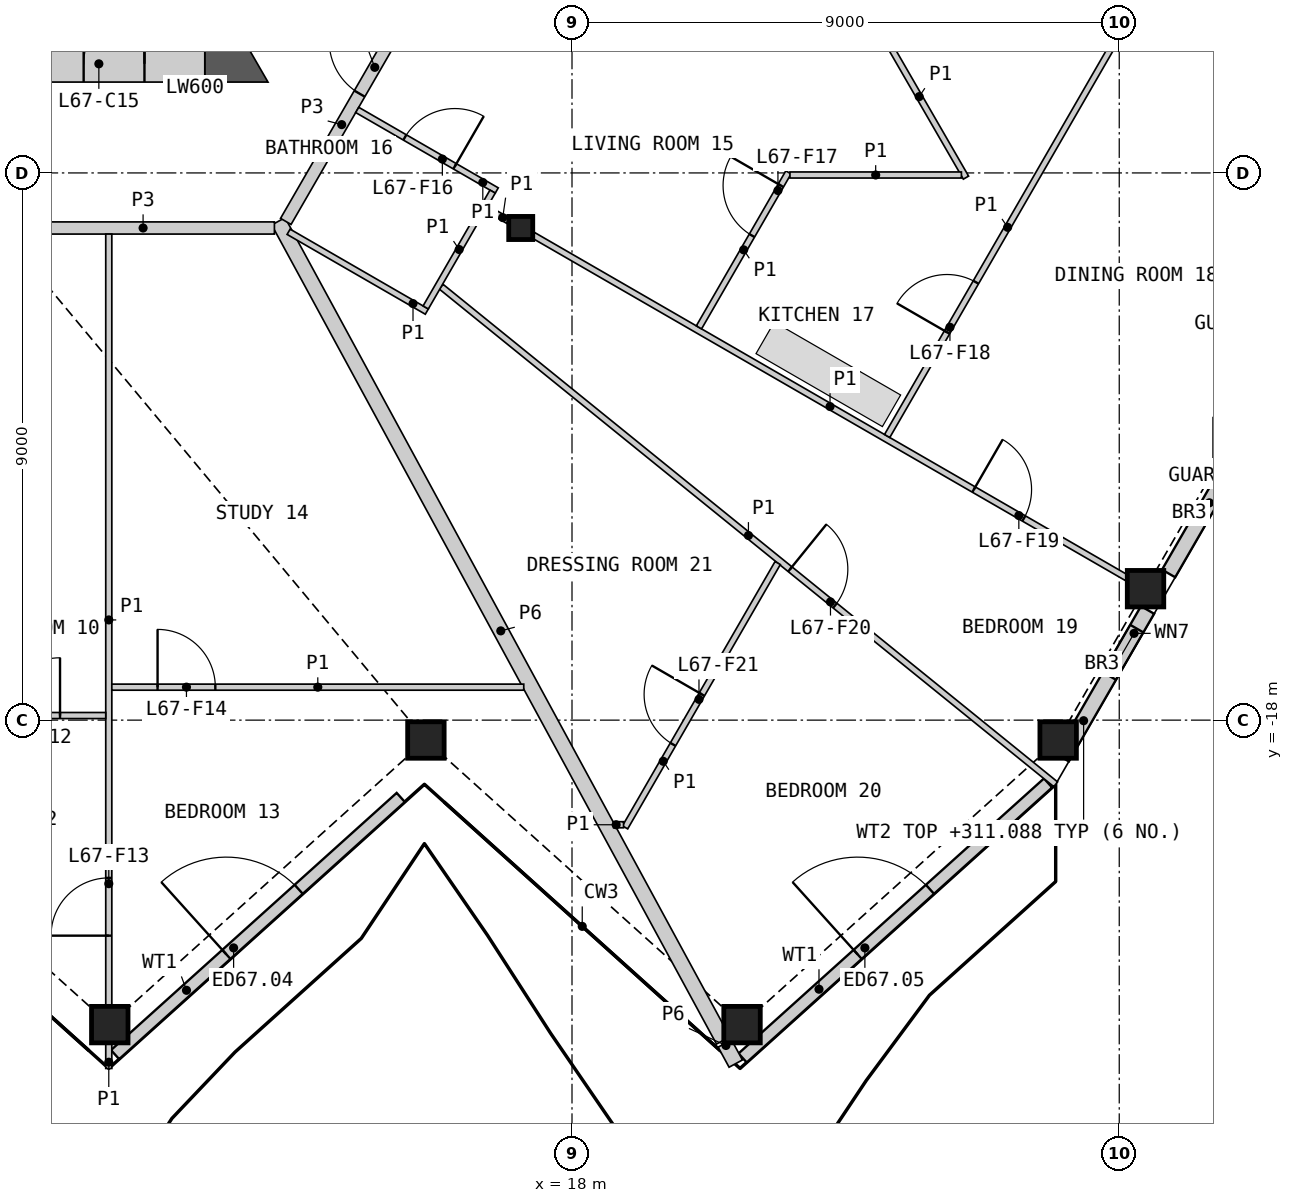
"""IFC4 building model, lengths in metres.
Left out: names, types, materials, properties, quantities, classifications, styles, units other than length and angle.
Written with IfcOpenShell. Run it as: python <this file> out.ifc"""

import sys

from ifc_helpers import new_model, si_unit, direction, frame, frame_2d, origin, origin_2d, place, context, subcontext, project, spatial, polyline, rectangle, hollow_rectangle, i_section, outline, extrude, element, fill, save


model = new_model("IFC4")
c1 = context("Model", 3, precision=1e-05, world=origin(), true_north=direction((0.0, 1.0)))
c2 = subcontext(c1, "Body", "Model", "MODEL_VIEW")
j1 = project(units=[si_unit("LENGTHUNIT", "METRE"), si_unit("PLANEANGLEUNIT", "RADIAN")], contexts=[c1])
p1 = place(None, origin())
s1 = spatial("IfcSite", under=j1, at=p1, CompositionType="ELEMENT")
p2 = place(p1, origin())
s2 = spatial("IfcBuilding", under=s1, at=p2, CompositionType="ELEMENT")
p3 = place(p2, frame((0.0, 0.0, 308.6)))
s3 = spatial("IfcBuildingStorey", under=s2, at=p3, CompositionType="ELEMENT", Elevation=308.6)
for number, where, z_axis, x_axis in (
    (1, (10.398, -23.008, 0.0), (0.0, 0.0, 1.0), (1.0, 0.0, 0.0)),
    (2, (15.597, -18.327, 0.0), (0.0, 0.0, 1.0), (1.0, 0.0, 0.0)),
    (3, (20.796, -23.008, 0.0), (0.0, 0.0, 1.0), (1.0, 0.0, 0.0)),
    (4, (25.995, -18.327, 0.0), (0.0, 0.0, 1.0), (1.0, 0.0, 0.0)),
    (5, (27.432, -15.838, 0.0), (0.0, 0.0, 1.0), (1.0, 0.0, 0.0)),
):
    element("IfcColumn", number, at=place(p3, frame(where, z_axis=z_axis, x_axis=x_axis)), inside=s3, PredefinedType="COLUMN", context=c2, shape_type="SweptSolid", body=[
        extrude(hollow_rectangle(XDim=0.6, YDim=0.6, WallThickness=0.04, at=origin_2d()), origin(), (0.0, 0.0, 1.0), 3.4),
    ])
p4 = place(p3, frame((17.157, -9.906, 0.0), z_axis=(0.0, 0.0, 1.0), x_axis=(1.0, 0.0, 0.0)))
e6 = element("IfcColumn", 6, at=p4, inside=s3, PredefinedType="COLUMN", context=c2, shape_type="SweptSolid", body=[
    extrude(i_section(OverallWidth=0.396, OverallDepth=0.381, WebThickness=0.019, FlangeThickness=0.03, at=origin_2d()), origin(), (0.0, 0.0, 1.0), 3.4),
])
p5 = place(p3, frame((10.485, -23.501, 0.0), z_axis=(0.0, 0.0, 1.0), x_axis=(0.743134744054, 0.669141802745, 0.0)))
e7 = element("IfcWall", 7, at=p5, inside=s3, PredefinedType="SOLIDWALL", context=c2, shape_type="SweptSolid", body=[
    extrude(rectangle(XDim=6.322, YDim=0.2, at=frame_2d((3.161, 0.0))), origin(), (0.0, 0.0, 1.0), 2.488),
])
p6 = place(p5, frame((2.463, 0.0, 0.0)))
e8 = element("IfcOpeningElement", 8, at=p6, cuts=e7, PredefinedType="OPENING", context=c2, shape_type="SweptSolid", body=[
    extrude(rectangle(XDim=1.6, YDim=2.25, at=frame_2d((0.8, 1.125))), frame((0.0, 0.11, 0.0), z_axis=(0.0, -1.0, 0.0), x_axis=(1.0, 0.0, 0.0)), (0.0, 0.0, 1.0), 0.22),
])
p7 = place(p3, frame((20.806, -23.556, 0.0), z_axis=(0.0, 0.0, 1.0), x_axis=(0.743145048269, 0.669130358924, 0.0)))
e9 = element("IfcWall", 9, at=p7, inside=s3, PredefinedType="SOLIDWALL", context=c2, shape_type="SweptSolid", body=[
    extrude(rectangle(XDim=6.759, YDim=0.2, at=frame_2d((3.379, 0.0))), origin(), (0.0, 0.0, 1.0), 2.488),
])
p8 = place(p7, frame((2.545, 0.0, 0.0)))
e10 = element("IfcOpeningElement", 10, at=p8, cuts=e9, PredefinedType="OPENING", context=c2, shape_type="SweptSolid", body=[
    extrude(rectangle(XDim=1.6, YDim=2.25, at=frame_2d((0.8, 1.125))), frame((0.0, 0.11, 0.0), z_axis=(0.0, -1.0, 0.0), x_axis=(1.0, 0.0, 0.0)), (0.0, 0.0, 1.0), 0.22),
])
p9 = place(p3, frame((26.063, -18.617, 0.0), z_axis=(0.0, 0.0, 1.0), x_axis=(0.499968627931, 0.866043515699, 0.0)))
e11 = element("IfcWall", 11, at=p9, inside=s3, PredefinedType="SOLIDWALL", context=c2, shape_type="SweptSolid", body=[
    extrude(rectangle(XDim=2.804, YDim=0.25, at=frame_2d((1.402, 0.0))), origin(), (0.0, 0.0, 1.0), 2.488),
])
p10 = place(p9, frame((1.55, 0.0, 1.6)))
e12 = element("IfcOpeningElement", 12, at=p10, cuts=e11, PredefinedType="OPENING", context=c2, shape_type="SweptSolid", body=[
    extrude(rectangle(XDim=0.9, YDim=0.6, at=frame_2d((0.45, 0.3))), frame((0.0, 0.135, 0.0), z_axis=(0.0, -1.0, 0.0), x_axis=(1.0, 0.0, 0.0)), (0.0, 0.0, 1.0), 0.27),
])
p11 = place(p3, frame((27.812, -15.588, 0.0), z_axis=(0.0, 0.0, 1.0), x_axis=(0.500032109083, 0.866006864803, 0.0)))
e13 = element("IfcWall", 13, at=p11, inside=s3, PredefinedType="SOLIDWALL", context=c2, shape_type="SweptSolid", body=[
    extrude(rectangle(XDim=2.684, YDim=0.25, at=frame_2d((1.342, 0.0))), origin(), (0.0, 0.0, 1.0), 2.488),
])
p12 = place(p3, origin())
e14 = element("IfcWall", 14, at=p12, inside=s3, PredefinedType="SHEAR", context=c2, shape_type="SweptSolid", body=[
    extrude(outline(polyline([(11.961, -7.506), (11.961, -6.906), (12.48, -6.606), (13.0, -7.506), (11.961, -7.506)])), origin(), (0.0, 0.0, 1.0), 3.1),
])
p13 = place(p3, frame((9.369, -7.206, 0.0), z_axis=(0.0, 0.0, 1.0), x_axis=(1.0, 0.0, 0.0)))
e15 = element("IfcWall", 15, at=p13, inside=s3, PredefinedType="SHEAR", context=c2, shape_type="SweptSolid", body=[
    extrude(rectangle(XDim=2.592, YDim=0.6, at=frame_2d((1.296, 0.0))), origin(), (0.0, 0.0, 1.0), 3.1),
])
p14 = place(p13, frame((0.6, 0.0, 0.0)))
e16 = element("IfcOpeningElement", 16, at=p14, cuts=e15, PredefinedType="OPENING", context=c2, shape_type="SweptSolid", body=[
    extrude(rectangle(XDim=1.0, YDim=2.1, at=frame_2d((0.5, 1.05))), frame((0.0, 0.31, 0.0), z_axis=(0.0, -1.0, 0.0), x_axis=(1.0, 0.0, 0.0)), (0.0, 0.0, 1.0), 0.62),
])
p15 = place(p3, frame((13.171, -9.796, 0.0), z_axis=(0.0, 0.0, 1.0), x_axis=(0.477178668135, -0.878806303275, 0.0)))
e17 = element("IfcWall", 17, at=p15, inside=s3, PredefinedType="PARTITIONING", context=c2, shape_type="SweptSolid", body=[
    extrude(rectangle(XDim=15.33, YDim=0.25, at=frame_2d((7.665, 0.0))), origin(), (0.0, 0.0, 1.0), 2.33),
])
p16 = place(p3, frame((8.786, -9.906, 0.0), z_axis=(0.0, 0.0, 1.0), x_axis=(1.0, 0.0, 0.0)))
e18 = element("IfcWall", 18, at=p16, inside=s3, PredefinedType="PARTITIONING", context=c2, shape_type="SweptSolid", body=[
    extrude(rectangle(XDim=4.32, YDim=0.2, at=frame_2d((2.16, 0.0))), origin(), (0.0, 0.0, 1.0), 3.1),
])
p17 = place(p3, frame((13.293, -9.797, 0.0), z_axis=(0.0, 0.0, 1.0), x_axis=(0.499967746641, 0.866044024469, 0.0)))
e19 = element("IfcWall", 19, at=p17, inside=s3, PredefinedType="PARTITIONING", context=c2, shape_type="SweptSolid", body=[
    extrude(rectangle(XDim=3.676, YDim=0.2, at=frame_2d((1.838, 0.0))), origin(), (0.0, 0.0, 1.0), 3.1),
])
p18 = place(p17, frame((2.426, 0.0, 0.0)))
e20 = element("IfcOpeningElement", 20, at=p18, cuts=e19, PredefinedType="OPENING", context=c2, shape_type="SweptSolid", body=[
    extrude(rectangle(XDim=1.0, YDim=2.1, at=frame_2d((0.5, 1.05))), frame((0.0, 0.11, 0.0), z_axis=(0.0, -1.0, 0.0), x_axis=(1.0, 0.0, 0.0)), (0.0, 0.0, 1.0), 0.22),
])
p19 = place(p3, frame((20.514, -23.318, 0.0), z_axis=(0.0, 0.0, 1.0), x_axis=(0.477077538769, -0.878861207474, 0.0)))
e21 = element("IfcWall", 21, at=p19, inside=s3, PredefinedType="PARTITIONING", context=c2, shape_type="SweptSolid", body=[
    extrude(rectangle(XDim=0.376, YDim=0.25, at=frame_2d((0.188, 0.0))), origin(), (0.0, 0.0, 1.0), 2.33),
])
p20 = place(p3, frame((15.848, -10.871, 0.0), z_axis=(0.0, 0.0, 1.0), x_axis=(0.77713687197, -0.629331615465, 0.0)))
e22 = element("IfcWall", 22, at=p20, inside=s3, PredefinedType="PARTITIONING", context=c2, shape_type="SweptSolid", body=[
    extrude(rectangle(XDim=13.004, YDim=0.1, at=frame_2d((6.502, 0.0))), origin(), (0.0, 0.0, 1.0), 2.33),
])
p21 = place(p20, frame((7.384, 0.0, 0.0)))
e23 = element("IfcOpeningElement", 23, at=p21, cuts=e22, PredefinedType="OPENING", context=c2, shape_type="SweptSolid", body=[
    extrude(rectangle(XDim=0.95, YDim=2.1, at=frame_2d((0.475, 1.05))), frame((0.0, 0.06, 0.0), z_axis=(0.0, -1.0, 0.0), x_axis=(1.0, 0.0, 0.0)), (0.0, 0.0, 1.0), 0.12),
])
p22 = place(p3, frame((10.382, -22.698, 0.0), z_axis=(0.0, 0.0, 1.0), x_axis=(0.0, 1.0, 0.0)))
e24 = element("IfcWall", 24, at=p22, inside=s3, PredefinedType="PARTITIONING", context=c2, shape_type="SweptSolid", body=[
    extrude(rectangle(XDim=12.692, YDim=0.1, at=frame_2d((6.346, 0.0))), origin(), (0.0, 0.0, 1.0), 2.33),
])
p23 = place(p22, frame((1.153, 0.0, 0.0)))
e25 = element("IfcOpeningElement", 25, at=p23, cuts=e24, PredefinedType="OPENING", context=c2, shape_type="SweptSolid", body=[
    extrude(rectangle(XDim=0.95, YDim=2.1, at=frame_2d((0.475, 1.05))), frame((0.0, 0.06, 0.0), z_axis=(0.0, -1.0, 0.0), x_axis=(1.0, 0.0, 0.0)), (0.0, 0.0, 1.0), 0.12),
])
p24 = place(p3, frame((17.365, -10.025, 0.0), z_axis=(0.0, 0.0, 1.0), x_axis=(0.866021046153, -0.500007547564, 0.0)))
e26 = element("IfcWall", 26, at=p24, inside=s3, PredefinedType="PARTITIONING", context=c2, shape_type="SweptSolid", body=[
    extrude(rectangle(XDim=11.267, YDim=0.1, at=frame_2d((5.634, 0.0))), origin(), (0.0, 0.0, 1.0), 2.33),
])
p25 = place(p24, frame((8.364, 0.0, 0.0)))
e27 = element("IfcOpeningElement", 27, at=p25, cuts=e26, PredefinedType="OPENING", context=c2, shape_type="SweptSolid", body=[
    extrude(rectangle(XDim=0.95, YDim=2.1, at=frame_2d((0.475, 1.05))), frame((0.0, 0.06, 0.0), z_axis=(0.0, -1.0, 0.0), x_axis=(1.0, 0.0, 0.0)), (0.0, 0.0, 1.0), 0.12),
])
p26 = place(p3, frame((0.05, -17.924, 0.0), z_axis=(0.0, 0.0, 1.0), x_axis=(1.0, 0.0, 0.0)))
e28 = element("IfcWall", 28, at=p26, inside=s3, PredefinedType="PARTITIONING", context=c2, shape_type="SweptSolid", body=[
    extrude(rectangle(XDim=10.282, YDim=0.1, at=frame_2d((5.141, 0.0))), origin(), (0.0, 0.0, 1.0), 2.33),
])
p27 = place(p26, frame((0.752, 0.0, 0.0)))
e29 = element("IfcOpeningElement", 29, at=p27, cuts=e28, PredefinedType="OPENING", context=c2, shape_type="SweptSolid", body=[
    extrude(rectangle(XDim=0.95, YDim=2.1, at=frame_2d((0.475, 1.05))), frame((0.0, 0.06, 0.0), z_axis=(0.0, -1.0, 0.0), x_axis=(1.0, 0.0, 0.0)), (0.0, 0.0, 1.0), 0.12),
])
p28 = place(p26, frame((8.58, 0.0, 0.0)))
e30 = element("IfcOpeningElement", 30, at=p28, cuts=e28, PredefinedType="OPENING", context=c2, shape_type="SweptSolid", body=[
    extrude(rectangle(XDim=0.95, YDim=2.1, at=frame_2d((0.475, 1.05))), frame((0.0, 0.06, 0.0), z_axis=(0.0, -1.0, 0.0), x_axis=(1.0, 0.0, 0.0)), (0.0, 0.0, 1.0), 0.12),
])
p29 = place(p3, frame((23.183, -13.327, 0.0), z_axis=(0.0, 0.0, 1.0), x_axis=(0.499991741039, 0.866030172045, 0.0)))
e31 = element("IfcWall", 31, at=p29, inside=s3, PredefinedType="PARTITIONING", context=c2, shape_type="SweptSolid", body=[
    extrude(rectangle(XDim=7.927, YDim=0.1, at=frame_2d((3.963, 0.0))), origin(), (0.0, 0.0, 1.0), 2.33),
])
p30 = place(p29, frame((1.97, 0.0, 0.0)))
e32 = element("IfcOpeningElement", 32, at=p30, cuts=e31, PredefinedType="OPENING", context=c2, shape_type="SweptSolid", body=[
    extrude(rectangle(XDim=0.95, YDim=2.1, at=frame_2d((0.475, 1.05))), frame((0.0, 0.06, 0.0), z_axis=(0.0, -1.0, 0.0), x_axis=(1.0, 0.0, 0.0)), (0.0, 0.0, 1.0), 0.12),
])
p31 = place(p3, frame((10.432, -17.458, 0.0), z_axis=(0.0, 0.0, 1.0), x_axis=(1.0, 0.0, 0.0)))
e33 = element("IfcWall", 33, at=p31, inside=s3, PredefinedType="PARTITIONING", context=c2, shape_type="SweptSolid", body=[
    extrude(rectangle(XDim=6.775, YDim=0.1, at=frame_2d((3.387, 0.0))), origin(), (0.0, 0.0, 1.0), 2.33),
])
p32 = place(p31, frame((0.752, 0.0, 0.0)))
e34 = element("IfcOpeningElement", 34, at=p32, cuts=e33, PredefinedType="OPENING", context=c2, shape_type="SweptSolid", body=[
    extrude(rectangle(XDim=0.95, YDim=2.1, at=frame_2d((0.475, 1.05))), frame((0.0, 0.06, 0.0), z_axis=(0.0, -1.0, 0.0), x_axis=(1.0, 0.0, 0.0)), (0.0, 0.0, 1.0), 0.12),
])
p33 = place(p3, frame((18.873, -19.764, 0.0), z_axis=(0.0, 0.0, 1.0), x_axis=(0.499983455602, 0.866034955486, 0.0)))
e35 = element("IfcWall", 35, at=p33, inside=s3, PredefinedType="PARTITIONING", context=c2, shape_type="SweptSolid", body=[
    extrude(rectangle(XDim=5.02, YDim=0.1, at=frame_2d((2.51, 0.0))), origin(), (0.0, 0.0, 1.0), 2.33),
])
p34 = place(p33, frame((1.576, 0.0, 0.0)))
e36 = element("IfcOpeningElement", 36, at=p34, cuts=e35, PredefinedType="OPENING", context=c2, shape_type="SweptSolid", body=[
    extrude(rectangle(XDim=0.95, YDim=2.1, at=frame_2d((0.475, 1.05))), frame((0.0, 0.06, 0.0), z_axis=(0.0, -1.0, 0.0), x_axis=(1.0, 0.0, 0.0)), (0.0, 0.0, 1.0), 0.12),
])
p35 = place(p3, frame((22.941, -6.413, 0.0), z_axis=(0.0, 0.0, 1.0), x_axis=(0.500013199183, -0.866017783098, 0.0)))
e37 = element("IfcWall", 37, at=p35, inside=s3, PredefinedType="PARTITIONING", context=c2, shape_type="SweptSolid", body=[
    extrude(rectangle(XDim=3.077, YDim=0.1, at=frame_2d((1.539, 0.0))), origin(), (0.0, 0.0, 1.0), 2.33),
])
p36 = place(p3, frame((20.088, -11.54, 0.0), z_axis=(0.0, 0.0, 1.0), x_axis=(0.500055103712, 0.865993587304, 0.0)))
e38 = element("IfcWall", 38, at=p36, inside=s3, PredefinedType="PARTITIONING", context=c2, shape_type="SweptSolid", body=[
    extrude(rectangle(XDim=2.944, YDim=0.1, at=frame_2d((1.472, 0.0))), origin(), (0.0, 0.0, 1.0), 2.33),
])
p37 = place(p36, frame((1.744, 0.0, 0.0)))
e39 = element("IfcOpeningElement", 39, at=p37, cuts=e38, PredefinedType="OPENING", context=c2, shape_type="SweptSolid", body=[
    extrude(rectangle(XDim=0.95, YDim=2.1, at=frame_2d((0.475, 1.05))), frame((0.0, 0.06, 0.0), z_axis=(0.0, -1.0, 0.0), x_axis=(1.0, 0.0, 0.0)), (0.0, 0.0, 1.0), 0.12),
])
p38 = place(p3, frame((21.584, -9.034, 0.0), z_axis=(0.0, 0.0, 1.0), x_axis=(1.0, 0.0, 0.0)))
e40 = element("IfcWall", 40, at=p38, inside=s3, PredefinedType="PARTITIONING", context=c2, shape_type="SweptSolid", body=[
    extrude(rectangle(XDim=2.82, YDim=0.1, at=frame_2d((1.41, 0.0))), origin(), (0.0, 0.0, 1.0), 2.33),
])
p39 = place(p3, frame((14.468, -7.964, 0.0), z_axis=(0.0, 0.0, 1.0), x_axis=(0.865989200783, -0.500062700197, 0.0)))
e41 = element("IfcWall", 41, at=p39, inside=s3, PredefinedType="PARTITIONING", context=c2, shape_type="SweptSolid", body=[
    extrude(rectangle(XDim=2.65, YDim=0.1, at=frame_2d((1.325, 0.0))), origin(), (0.0, 0.0, 1.0), 2.33),
])
p40 = place(p39, frame((0.905, 0.0, 0.0)))
e42 = element("IfcOpeningElement", 42, at=p40, cuts=e41, PredefinedType="OPENING", context=c2, shape_type="SweptSolid", body=[
    extrude(rectangle(XDim=0.95, YDim=2.1, at=frame_2d((0.475, 1.05))), frame((0.0, 0.06, 0.0), z_axis=(0.0, -1.0, 0.0), x_axis=(1.0, 0.0, 0.0)), (0.0, 0.0, 1.0), 0.12),
])
p41 = place(p3, frame((13.339, -9.968, 0.0), z_axis=(0.0, 0.0, 1.0), x_axis=(0.866036909293, -0.499980071345, 0.0)))
e43 = element("IfcWall", 43, at=p41, inside=s3, PredefinedType="PARTITIONING", context=c2, shape_type="SweptSolid", body=[
    extrude(rectangle(XDim=2.625, YDim=0.1, at=frame_2d((1.312, 0.0))), origin(), (0.0, 0.0, 1.0), 2.33),
])
p42 = place(p3, frame((15.594, -11.212, 0.0), z_axis=(0.0, 0.0, 1.0), x_axis=(0.499898558967, 0.866083962871, 0.0)))
e44 = element("IfcWall", 44, at=p42, inside=s3, PredefinedType="PARTITIONING", context=c2, shape_type="SweptSolid", body=[
    extrude(rectangle(XDim=2.2, YDim=0.1, at=frame_2d((1.1, 0.0))), origin(), (0.0, 0.0, 1.0), 2.33),
])
p43 = place(p3, frame((16.594, -9.581, 0.0), z_axis=(0.0, 0.0, 1.0), x_axis=(0.866036909293, -0.499980071345, 0.0)))
e45 = element("IfcWall", 45, at=p43, inside=s3, PredefinedType="PARTITIONING", context=c2, shape_type="SweptSolid", body=[
    extrude(rectangle(XDim=0.41, YDim=0.1, at=frame_2d((0.205, 0.0))), origin(), (0.0, 0.0, 1.0), 2.33),
])
p44 = place(p3, frame((10.382, -23.729, 0.0), z_axis=(0.0, 0.0, 1.0), x_axis=(0.0, 1.0, 0.0)))
e46 = element("IfcWall", 46, at=p44, inside=s3, PredefinedType="PARTITIONING", context=c2, shape_type="SweptSolid", body=[
    extrude(rectangle(XDim=0.411, YDim=0.1, at=frame_2d((0.206, 0.0))), origin(), (0.0, 0.0, 1.0), 2.33),
])
p45 = place(p3, frame((18.685, -19.721, 0.0), z_axis=(0.0, 0.0, 1.0), x_axis=(1.0, 0.0, 0.0)))
e47 = element("IfcWall", 47, at=p45, inside=s3, PredefinedType="PARTITIONING", context=c2, shape_type="SweptSolid", body=[
    extrude(rectangle(XDim=0.162, YDim=0.1, at=frame_2d((0.081, 0.0))), origin(), (0.0, 0.0, 1.0), 2.33),
])
p46 = place(p6, origin())
e48 = element("IfcDoor", 48, at=p46, inside=s3, OperationType="DOUBLE_DOOR_SINGLE_SWING", PredefinedType="DOOR", context=c2, shape_type="SweptSolid", body=[
    extrude(rectangle(XDim=1.6, YDim=2.25, at=frame_2d((0.8, 1.125))), frame((0.0, 0.025, 0.0), z_axis=(0.0, -1.0, 0.0), x_axis=(1.0, 0.0, 0.0)), (0.0, 0.0, 1.0), 0.05),
])
fill(e8, e48)
p47 = place(p8, origin())
e49 = element("IfcDoor", 49, at=p47, inside=s3, OperationType="DOUBLE_DOOR_SINGLE_SWING", PredefinedType="DOOR", context=c2, shape_type="SweptSolid", body=[
    extrude(rectangle(XDim=1.6, YDim=2.25, at=frame_2d((0.8, 1.125))), frame((0.0, 0.025, 0.0), z_axis=(0.0, -1.0, 0.0), x_axis=(1.0, 0.0, 0.0)), (0.0, 0.0, 1.0), 0.05),
])
fill(e10, e49)
p48 = place(p10, origin())
e50 = element("IfcWindow", 50, at=p48, inside=s3, PartitioningType="SINGLE_PANEL", PredefinedType="WINDOW", context=c2, shape_type="SweptSolid", body=[
    extrude(rectangle(XDim=0.9, YDim=0.6, at=frame_2d((0.45, 0.3))), frame((0.0, 0.03, 0.0), z_axis=(0.0, -1.0, 0.0), x_axis=(1.0, 0.0, 0.0)), (0.0, 0.0, 1.0), 0.06),
])
fill(e12, e50)
p49 = place(p14, origin())
e51 = element("IfcDoor", 51, at=p49, inside=s3, OperationType="SINGLE_SWING_RIGHT", PredefinedType="DOOR", context=c2, shape_type="SweptSolid", body=[
    extrude(rectangle(XDim=1.0, YDim=2.1, at=frame_2d((0.5, 1.05))), frame((0.0, 0.055, 0.0), z_axis=(0.0, -1.0, 0.0), x_axis=(1.0, 0.0, 0.0)), (0.0, 0.0, 1.0), 0.05),
])
fill(e16, e51)
p50 = place(p28, origin())
e52 = element("IfcDoor", 52, at=p50, inside=s3, OperationType="SINGLE_SWING_RIGHT", PredefinedType="DOOR", context=c2, shape_type="SweptSolid", body=[
    extrude(rectangle(XDim=0.95, YDim=2.1, at=frame_2d((0.475, 1.05))), frame((0.0, 0.025, 0.0), z_axis=(0.0, -1.0, 0.0), x_axis=(1.0, 0.0, 0.0)), (0.0, 0.0, 1.0), 0.05),
])
fill(e30, e52)
p51 = place(p23, origin())
e53 = element("IfcDoor", 53, at=p51, inside=s3, OperationType="SINGLE_SWING_LEFT", PredefinedType="DOOR", context=c2, shape_type="SweptSolid", body=[
    extrude(rectangle(XDim=0.95, YDim=2.1, at=frame_2d((0.475, 1.05))), frame((0.0, 0.025, 0.0), z_axis=(0.0, -1.0, 0.0), x_axis=(1.0, 0.0, 0.0)), (0.0, 0.0, 1.0), 0.05),
])
fill(e25, e53)
p52 = place(p32, origin())
e54 = element("IfcDoor", 54, at=p52, inside=s3, OperationType="SINGLE_SWING_LEFT", PredefinedType="DOOR", context=c2, shape_type="SweptSolid", body=[
    extrude(rectangle(XDim=0.95, YDim=2.1, at=frame_2d((0.475, 1.05))), frame((0.0, 0.025, 0.0), z_axis=(0.0, -1.0, 0.0), x_axis=(1.0, 0.0, 0.0)), (0.0, 0.0, 1.0), 0.05),
])
fill(e34, e54)
p53 = place(p18, origin())
e55 = element("IfcDoor", 55, at=p53, inside=s3, OperationType="SINGLE_SWING_RIGHT", PredefinedType="DOOR", context=c2, shape_type="SweptSolid", body=[
    extrude(rectangle(XDim=1.0, YDim=2.1, at=frame_2d((0.5, 1.05))), frame((0.0, 0.025, 0.0), z_axis=(0.0, -1.0, 0.0), x_axis=(1.0, 0.0, 0.0)), (0.0, 0.0, 1.0), 0.05),
])
fill(e20, e55)
p54 = place(p40, origin())
e56 = element("IfcDoor", 56, at=p54, inside=s3, OperationType="SINGLE_SWING_RIGHT", PredefinedType="DOOR", context=c2, shape_type="SweptSolid", body=[
    extrude(rectangle(XDim=0.95, YDim=2.1, at=frame_2d((0.475, 1.05))), frame((0.0, 0.025, 0.0), z_axis=(0.0, -1.0, 0.0), x_axis=(1.0, 0.0, 0.0)), (0.0, 0.0, 1.0), 0.05),
])
fill(e42, e56)
p55 = place(p37, origin())
e57 = element("IfcDoor", 57, at=p55, inside=s3, OperationType="SINGLE_SWING_RIGHT", PredefinedType="DOOR", context=c2, shape_type="SweptSolid", body=[
    extrude(rectangle(XDim=0.95, YDim=2.1, at=frame_2d((0.475, 1.05))), frame((0.0, 0.025, 0.0), z_axis=(0.0, -1.0, 0.0), x_axis=(1.0, 0.0, 0.0)), (0.0, 0.0, 1.0), 0.05),
])
fill(e39, e57)
p56 = place(p30, origin())
e58 = element("IfcDoor", 58, at=p56, inside=s3, OperationType="SINGLE_SWING_LEFT", PredefinedType="DOOR", context=c2, shape_type="SweptSolid", body=[
    extrude(rectangle(XDim=0.95, YDim=2.1, at=frame_2d((0.475, 1.05))), frame((0.0, 0.025, 0.0), z_axis=(0.0, -1.0, 0.0), x_axis=(1.0, 0.0, 0.0)), (0.0, 0.0, 1.0), 0.05),
])
fill(e32, e58)
p57 = place(p25, origin())
e59 = element("IfcDoor", 59, at=p57, inside=s3, OperationType="SINGLE_SWING_LEFT", PredefinedType="DOOR", context=c2, shape_type="SweptSolid", body=[
    extrude(rectangle(XDim=0.95, YDim=2.1, at=frame_2d((0.475, 1.05))), frame((0.0, 0.025, 0.0), z_axis=(0.0, -1.0, 0.0), x_axis=(1.0, 0.0, 0.0)), (0.0, 0.0, 1.0), 0.05),
])
fill(e27, e59)
p58 = place(p21, origin())
e60 = element("IfcDoor", 60, at=p58, inside=s3, OperationType="SINGLE_SWING_LEFT", PredefinedType="DOOR", context=c2, shape_type="SweptSolid", body=[
    extrude(rectangle(XDim=0.95, YDim=2.1, at=frame_2d((0.475, 1.05))), frame((0.0, 0.025, 0.0), z_axis=(0.0, -1.0, 0.0), x_axis=(1.0, 0.0, 0.0)), (0.0, 0.0, 1.0), 0.05),
])
fill(e23, e60)
p59 = place(p34, origin())
e61 = element("IfcDoor", 61, at=p59, inside=s3, OperationType="SINGLE_SWING_RIGHT", PredefinedType="DOOR", context=c2, shape_type="SweptSolid", body=[
    extrude(rectangle(XDim=0.95, YDim=2.1, at=frame_2d((0.475, 1.05))), frame((0.0, 0.025, 0.0), z_axis=(0.0, -1.0, 0.0), x_axis=(1.0, 0.0, 0.0)), (0.0, 0.0, 1.0), 0.05),
])
fill(e36, e61)
save(model, sys.argv[1])
